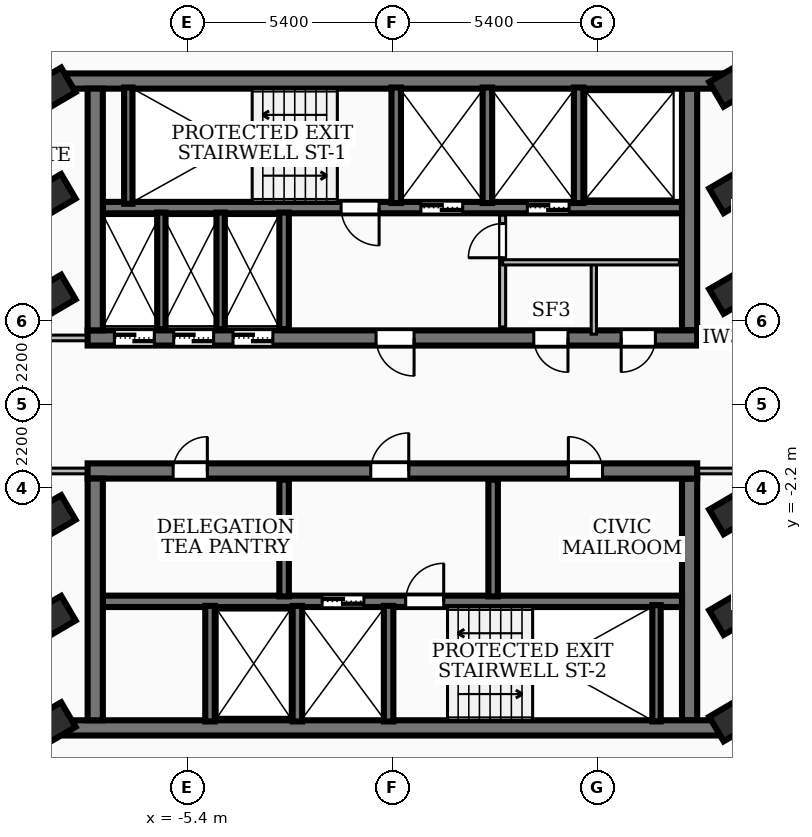
"""IFC4 building model, lengths in metres.
Left out: names, types, materials, properties, quantities, classifications, styles, units other than length and angle.
Written with IfcOpenShell. Run it as: python <this file> out.ifc"""

import sys

from ifc_helpers import new_model, si_unit, direction, frame, frame_2d, origin, origin_2d, place, context, subcontext, project, spatial, rectangle, extrude, element, fill, save


model = new_model("IFC4")
c1 = context("Model", 3, precision=1e-05, world=origin(), true_north=direction((0.0, 1.0)))
c2 = subcontext(c1, "Body", "Model", "MODEL_VIEW")
j1 = project(units=[si_unit("LENGTHUNIT", "METRE"), si_unit("PLANEANGLEUNIT", "RADIAN")], contexts=[c1])
p1 = place(None, origin())
s1 = spatial("IfcSite", under=j1, at=p1, CompositionType="ELEMENT")
p2 = place(p1, origin())
s2 = spatial("IfcBuilding", under=s1, at=p2, CompositionType="ELEMENT")
p3 = place(p2, frame((0.0, 0.0, 205.2)))
s3 = spatial("IfcBuildingStorey", under=s2, at=p3, CompositionType="ELEMENT", Elevation=205.2)
p4 = place(p3, frame((-8.78, 8.51, 0.0), z_axis=(0.0, 0.0, 1.0), x_axis=(1.0, 0.0, 0.0)))
e1 = element("IfcWall", 1, at=p4, inside=s3, PredefinedType="SHEAR", context=c2, shape_type="SweptSolid", body=[
    extrude(rectangle(XDim=17.56, YDim=0.4, at=frame_2d((8.78, 0.0))), origin(), (0.0, 0.0, 1.0), 3.16),
])
p5 = place(p3, frame((8.02, 1.75, 0.0), z_axis=(0.0, 0.0, 1.0), x_axis=(-1.0, 0.0, 0.0)))
e2 = element("IfcWall", 2, at=p5, inside=s3, PredefinedType="SHEAR", context=c2, shape_type="SweptSolid", body=[
    extrude(rectangle(XDim=16.04, YDim=0.4, at=frame_2d((8.02, 0.0))), origin(), (0.0, 0.0, 1.0), 3.16),
])
p6 = place(p5, frame((7.45, 0.0, 0.0)))
e3 = element("IfcOpeningElement", 3, at=p6, cuts=e2, PredefinedType="OPENING", context=c2, shape_type="SweptSolid", body=[
    extrude(rectangle(XDim=1.0, YDim=2.1, at=frame_2d((0.5, 1.05))), frame((0.0, 0.21, 0.0), z_axis=(0.0, -1.0, 0.0), x_axis=(1.0, 0.0, 0.0)), (0.0, 0.0, 1.0), 0.42),
])
p7 = place(p5, frame((14.285, 0.0, 0.0)))
e4 = element("IfcOpeningElement", 4, at=p7, cuts=e2, PredefinedType="OPENING", context=c2, shape_type="SweptSolid", body=[
    extrude(rectangle(XDim=1.05, YDim=2.15, at=frame_2d((0.525, 1.075))), frame((0.0, 0.21, 0.0), z_axis=(0.0, -1.0, 0.0), x_axis=(1.0, 0.0, 0.0)), (0.0, 0.0, 1.0), 0.42),
])
p8 = place(p5, frame((12.725, 0.0, 0.0)))
e5 = element("IfcOpeningElement", 5, at=p8, cuts=e2, PredefinedType="OPENING", context=c2, shape_type="SweptSolid", body=[
    extrude(rectangle(XDim=1.05, YDim=2.15, at=frame_2d((0.525, 1.075))), frame((0.0, 0.21, 0.0), z_axis=(0.0, -1.0, 0.0), x_axis=(1.0, 0.0, 0.0)), (0.0, 0.0, 1.0), 0.42),
])
p9 = place(p5, frame((11.165, 0.0, 0.0)))
e6 = element("IfcOpeningElement", 6, at=p9, cuts=e2, PredefinedType="OPENING", context=c2, shape_type="SweptSolid", body=[
    extrude(rectangle(XDim=1.05, YDim=2.15, at=frame_2d((0.525, 1.075))), frame((0.0, 0.21, 0.0), z_axis=(0.0, -1.0, 0.0), x_axis=(1.0, 0.0, 0.0)), (0.0, 0.0, 1.0), 0.42),
])
p10 = place(p5, frame((3.4, 0.0, 0.0)))
e7 = element("IfcOpeningElement", 7, at=p10, cuts=e2, PredefinedType="OPENING", context=c2, shape_type="SweptSolid", body=[
    extrude(rectangle(XDim=0.9, YDim=2.06, at=frame_2d((0.45, 1.03))), frame((0.0, 0.21, 0.0), z_axis=(0.0, -1.0, 0.0), x_axis=(1.0, 0.0, 0.0)), (0.0, 0.0, 1.0), 0.42),
])
p11 = place(p5, frame((1.1, 0.0, 0.0)))
e8 = element("IfcOpeningElement", 8, at=p11, cuts=e2, PredefinedType="OPENING", context=c2, shape_type="SweptSolid", body=[
    extrude(rectangle(XDim=0.9, YDim=2.06, at=frame_2d((0.45, 1.03))), frame((0.0, 0.21, 0.0), z_axis=(0.0, -1.0, 0.0), x_axis=(1.0, 0.0, 0.0)), (0.0, 0.0, 1.0), 0.42),
])
for number, where, z_axis, x_axis in (
    (9, (-7.82, 1.95, 0.0), (0.0, 0.0, 1.0), (0.0, 1.0, 0.0)),
    (10, (7.82, 8.31, 0.0), (0.0, 0.0, 1.0), (0.0, -1.0, 0.0)),
):
    element("IfcWall", number, at=place(p3, frame(where, z_axis=z_axis, x_axis=x_axis)), inside=s3, PredefinedType="SHEAR", context=c2, shape_type="SweptSolid", body=[
        extrude(rectangle(XDim=6.36, YDim=0.4, at=frame_2d((3.18, 0.0))), origin(), (0.0, 0.0, 1.0), 3.16),
    ])
p12 = place(p3, frame((7.62, 5.18, 0.0), z_axis=(0.0, 0.0, 1.0), x_axis=(-1.0, 0.0, 0.0)))
e11 = element("IfcWall", 11, at=p12, inside=s3, PredefinedType="SOLIDWALL", context=c2, shape_type="SweptSolid", body=[
    extrude(rectangle(XDim=15.24, YDim=0.3, at=frame_2d((7.62, 0.0))), origin(), (0.0, 0.0, 1.0), 3.16),
])
p13 = place(p12, frame((5.77, 0.0, 0.0)))
e12 = element("IfcOpeningElement", 12, at=p13, cuts=e11, PredefinedType="OPENING", context=c2, shape_type="SweptSolid", body=[
    extrude(rectangle(XDim=1.1, YDim=2.15, at=frame_2d((0.55, 1.075))), frame((0.0, 0.16, 0.0), z_axis=(0.0, -1.0, 0.0), x_axis=(1.0, 0.0, 0.0)), (0.0, 0.0, 1.0), 0.32),
])
p14 = place(p12, frame((2.97, 0.0, 0.0)))
e13 = element("IfcOpeningElement", 13, at=p14, cuts=e11, PredefinedType="OPENING", context=c2, shape_type="SweptSolid", body=[
    extrude(rectangle(XDim=1.1, YDim=2.15, at=frame_2d((0.55, 1.075))), frame((0.0, 0.16, 0.0), z_axis=(0.0, -1.0, 0.0), x_axis=(1.0, 0.0, 0.0)), (0.0, 0.0, 1.0), 0.32),
])
p15 = place(p12, frame((7.97, 0.0, 0.0)))
e14 = element("IfcOpeningElement", 14, at=p15, cuts=e11, PredefinedType="OPENING", context=c2, shape_type="SweptSolid", body=[
    extrude(rectangle(XDim=1.0, YDim=2.1, at=frame_2d((0.5, 1.05))), frame((0.0, 0.16, 0.0), z_axis=(0.0, -1.0, 0.0), x_axis=(1.0, 0.0, 0.0)), (0.0, 0.0, 1.0), 0.32),
])
p16 = place(p3, frame((8.78, -8.51, 0.0), z_axis=(0.0, 0.0, 1.0), x_axis=(-1.0, 0.0, 0.0)))
e15 = element("IfcWall", 15, at=p16, inside=s3, PredefinedType="SHEAR", context=c2, shape_type="SweptSolid", body=[
    extrude(rectangle(XDim=17.56, YDim=0.4, at=frame_2d((8.78, 0.0))), origin(), (0.0, 0.0, 1.0), 3.16),
])
p17 = place(p3, frame((-8.02, -1.75, 0.0), z_axis=(0.0, 0.0, 1.0), x_axis=(1.0, 0.0, 0.0)))
e16 = element("IfcWall", 16, at=p17, inside=s3, PredefinedType="SHEAR", context=c2, shape_type="SweptSolid", body=[
    extrude(rectangle(XDim=16.04, YDim=0.4, at=frame_2d((8.02, 0.0))), origin(), (0.0, 0.0, 1.0), 3.16),
])
p18 = place(p17, frame((7.45, 0.0, 0.0)))
e17 = element("IfcOpeningElement", 17, at=p18, cuts=e16, PredefinedType="OPENING", context=c2, shape_type="SweptSolid", body=[
    extrude(rectangle(XDim=1.0, YDim=2.1, at=frame_2d((0.5, 1.05))), frame((0.0, 0.21, 0.0), z_axis=(0.0, -1.0, 0.0), x_axis=(1.0, 0.0, 0.0)), (0.0, 0.0, 1.0), 0.42),
])
p19 = place(p17, frame((12.65, 0.0, 0.0)))
e18 = element("IfcOpeningElement", 18, at=p19, cuts=e16, PredefinedType="OPENING", context=c2, shape_type="SweptSolid", body=[
    extrude(rectangle(XDim=0.9, YDim=2.06, at=frame_2d((0.45, 1.03))), frame((0.0, 0.21, 0.0), z_axis=(0.0, -1.0, 0.0), x_axis=(1.0, 0.0, 0.0)), (0.0, 0.0, 1.0), 0.42),
])
p20 = place(p17, frame((2.25, 0.0, 0.0)))
e19 = element("IfcOpeningElement", 19, at=p20, cuts=e16, PredefinedType="OPENING", context=c2, shape_type="SweptSolid", body=[
    extrude(rectangle(XDim=0.9, YDim=2.06, at=frame_2d((0.45, 1.03))), frame((0.0, 0.21, 0.0), z_axis=(0.0, -1.0, 0.0), x_axis=(1.0, 0.0, 0.0)), (0.0, 0.0, 1.0), 0.42),
])
for number, where, z_axis, x_axis in (
    (20, (-7.82, -8.31, 0.0), (0.0, 0.0, 1.0), (0.0, 1.0, 0.0)),
    (21, (7.82, -1.95, 0.0), (0.0, 0.0, 1.0), (0.0, -1.0, 0.0)),
):
    element("IfcWall", number, at=place(p3, frame(where, z_axis=z_axis, x_axis=x_axis)), inside=s3, PredefinedType="SHEAR", context=c2, shape_type="SweptSolid", body=[
        extrude(rectangle(XDim=6.36, YDim=0.4, at=frame_2d((3.18, 0.0))), origin(), (0.0, 0.0, 1.0), 3.16),
    ])
p21 = place(p3, frame((-7.62, -5.18, 0.0), z_axis=(0.0, 0.0, 1.0), x_axis=(1.0, 0.0, 0.0)))
e22 = element("IfcWall", 22, at=p21, inside=s3, PredefinedType="SOLIDWALL", context=c2, shape_type="SweptSolid", body=[
    extrude(rectangle(XDim=15.24, YDim=0.3, at=frame_2d((7.62, 0.0))), origin(), (0.0, 0.0, 1.0), 3.16),
])
p22 = place(p21, frame((5.77, 0.0, 0.0)))
e23 = element("IfcOpeningElement", 23, at=p22, cuts=e22, PredefinedType="OPENING", context=c2, shape_type="SweptSolid", body=[
    extrude(rectangle(XDim=1.1, YDim=2.15, at=frame_2d((0.55, 1.075))), frame((0.0, 0.16, 0.0), z_axis=(0.0, -1.0, 0.0), x_axis=(1.0, 0.0, 0.0)), (0.0, 0.0, 1.0), 0.32),
])
p23 = place(p21, frame((7.97, 0.0, 0.0)))
e24 = element("IfcOpeningElement", 24, at=p23, cuts=e22, PredefinedType="OPENING", context=c2, shape_type="SweptSolid", body=[
    extrude(rectangle(XDim=1.0, YDim=2.1, at=frame_2d((0.5, 1.05))), frame((0.0, 0.16, 0.0), z_axis=(0.0, -1.0, 0.0), x_axis=(1.0, 0.0, 0.0)), (0.0, 0.0, 1.0), 0.32),
])
for number, where, z_axis, x_axis in (
    (25, (-6.95, 5.28, 0.0), (0.0, 0.0, 1.0), (0.0, 1.0, 0.0)),
    (26, (6.95, -8.34, 0.0), (0.0, 0.0, 1.0), (0.0, 1.0, 0.0)),
):
    element("IfcWall", number, at=place(p3, frame(where, z_axis=z_axis, x_axis=x_axis)), inside=s3, PredefinedType="SOLIDWALL", context=c2, shape_type="SweptSolid", body=[
        extrude(rectangle(XDim=3.06, YDim=0.22, at=frame_2d((1.53, 0.0))), origin(), (0.0, 0.0, 1.0), 3.16),
    ])
for number, where, z_axis, x_axis in (
    (27, (0.1, 5.3, 0.0), (0.0, 0.0, 1.0), (0.0, 1.0, 0.0)),
    (28, (2.5, 5.3, 0.0), (0.0, 0.0, 1.0), (0.0, 1.0, 0.0)),
    (29, (4.9, 5.3, 0.0), (0.0, 0.0, 1.0), (0.0, 1.0, 0.0)),
):
    element("IfcWall", number, at=place(p3, frame(where, z_axis=z_axis, x_axis=x_axis)), inside=s3, PredefinedType="SOLIDWALL", context=c2, shape_type="SweptSolid", body=[
        extrude(rectangle(XDim=3.04, YDim=0.25, at=frame_2d((1.52, 0.0))), origin(), (0.0, 0.0, 1.0), 3.16),
    ])
p24 = place(p3, frame((-2.85, 1.98, 0.0), z_axis=(0.0, 0.0, 1.0), x_axis=(0.0, 1.0, 0.0)))
e30 = element("IfcWall", 30, at=p24, inside=s3, PredefinedType="SOLIDWALL", context=c2, shape_type="SweptSolid", body=[
    extrude(rectangle(XDim=3.07, YDim=0.25, at=frame_2d((1.535, 0.0))), origin(), (0.0, 0.0, 1.0), 3.16),
])
for number, where, z_axis, x_axis in (
    (31, (-0.1, -8.34, 0.0), (0.0, 0.0, 1.0), (0.0, 1.0, 0.0)),
    (32, (-2.5, -8.34, 0.0), (0.0, 0.0, 1.0), (0.0, 1.0, 0.0)),
    (33, (-4.8, -8.34, 0.0), (0.0, 0.0, 1.0), (0.0, 1.0, 0.0)),
):
    element("IfcWall", number, at=place(p3, frame(where, z_axis=z_axis, x_axis=x_axis)), inside=s3, PredefinedType="SOLIDWALL", context=c2, shape_type="SweptSolid", body=[
        extrude(rectangle(XDim=3.04, YDim=0.25, at=frame_2d((1.52, 0.0))), origin(), (0.0, 0.0, 1.0), 3.16),
    ])
for number, where, z_axis, x_axis in (
    (34, (-2.85, -5.05, 0.0), (0.0, 0.0, 1.0), (0.0, 1.0, 0.0)),
    (35, (2.65, -5.05, 0.0), (0.0, 0.0, 1.0), (0.0, 1.0, 0.0)),
):
    element("IfcWall", number, at=place(p3, frame(where, z_axis=z_axis, x_axis=x_axis)), inside=s3, PredefinedType="SOLIDWALL", context=c2, shape_type="SweptSolid", body=[
        extrude(rectangle(XDim=3.07, YDim=0.25, at=frame_2d((1.535, 0.0))), origin(), (0.0, 0.0, 1.0), 3.16),
    ])
for number, where, z_axis, x_axis in (
    (36, (-6.08, 1.98, 0.0), (0.0, 0.0, 1.0), (0.0, 1.0, 0.0)),
    (37, (-4.52, 1.98, 0.0), (0.0, 0.0, 1.0), (0.0, 1.0, 0.0)),
):
    element("IfcWall", number, at=place(p3, frame(where, z_axis=z_axis, x_axis=x_axis)), inside=s3, PredefinedType="SOLIDWALL", context=c2, shape_type="SweptSolid", body=[
        extrude(rectangle(XDim=3.07, YDim=0.22, at=frame_2d((1.535, 0.0))), origin(), (0.0, 0.0, 1.0), 3.16),
    ])
for number, where, z_axis, x_axis in (
    (38, (-8.85, -5.55, 0.0), (0.0, 0.0, 1.0), (0.863, 0.506, 0.0)),
    (39, (-8.85, -2.9, 0.0), (0.0, 0.0, 1.0), (0.863, 0.506, 0.0)),
    (40, (-8.85, 2.9, 0.0), (0.0, 0.0, 1.0), (0.863, 0.506, 0.0)),
    (41, (-8.85, 5.55, 0.0), (0.0, 0.0, 1.0), (0.863, 0.506, 0.0)),
    (42, (8.85, -5.55, 0.0), (0.0, 0.0, 1.0), (0.863, 0.506, 0.0)),
    (43, (8.85, -2.9, 0.0), (0.0, 0.0, 1.0), (0.863, 0.506, 0.0)),
    (44, (8.85, 2.9, 0.0), (0.0, 0.0, 1.0), (0.863, 0.506, 0.0)),
    (45, (8.85, 5.55, 0.0), (0.0, 0.0, 1.0), (0.863, 0.506, 0.0)),
    (46, (-8.85, 8.35, 0.0), (0.0, 0.0, 1.0), (0.863, 0.506, 0.0)),
    (47, (8.85, -8.35, 0.0), (0.0, 0.0, 1.0), (0.863, 0.506, 0.0)),
    (48, (8.85, 8.35, 0.0), (0.0, 0.0, 1.0), (0.863, 0.506, 0.0)),
    (49, (-8.85, -8.35, 0.0), (0.0, 0.0, 1.0), (0.863, 0.506, 0.0)),
):
    element("IfcColumn", number, at=place(p3, frame(where, z_axis=z_axis, x_axis=x_axis)), inside=s3, PredefinedType="COLUMN", context=c2, shape_type="SweptSolid", body=[
        extrude(rectangle(XDim=0.75, YDim=0.75, at=origin_2d()), origin(), (0.0, 0.0, 1.0), 3.42),
    ])
p25 = place(p3, frame((-5.904, -18.492, 0.0), z_axis=(0.0, 0.0, 1.0), x_axis=(-0.506046465446, 0.862506217258, 0.0)))
e50 = element("IfcWall", 50, at=p25, inside=s3, PredefinedType="SOLIDWALL", context=c2, shape_type="SweptSolid", body=[
    extrude(rectangle(XDim=25.924, YDim=0.2, at=frame_2d((12.962, 0.0))), origin(), (0.0, 0.0, 1.0), 3.16),
])
p26 = place(p25, frame((0.85, 0.0, 0.85)))
e51 = element("IfcOpeningElement", 51, at=p26, cuts=e50, PredefinedType="OPENING", context=c2, shape_type="SweptSolid", body=[
    extrude(rectangle(XDim=1.8, YDim=2.0, at=frame_2d((0.9, 1.0))), frame((0.0, 0.11, 0.0), z_axis=(0.0, -1.0, 0.0), x_axis=(1.0, 0.0, 0.0)), (0.0, 0.0, 1.0), 0.22),
])
p27 = place(p3, frame((2.9, 2.04, 0.0), z_axis=(0.0, 0.0, 1.0), x_axis=(0.0, 1.0, 0.0)))
e52 = element("IfcWall", 52, at=p27, inside=s3, PredefinedType="PARTITIONING", context=c2, shape_type="SweptSolid", body=[
    extrude(rectangle(XDim=2.94, YDim=0.16, at=frame_2d((1.47, 0.0))), origin(), (0.0, 0.0, 1.0), 2.39),
])
p28 = place(p27, frame((1.82, 0.0, 0.0)))
e53 = element("IfcOpeningElement", 53, at=p28, cuts=e52, PredefinedType="OPENING", context=c2, shape_type="SweptSolid", body=[
    extrude(rectangle(XDim=0.9, YDim=2.06, at=frame_2d((0.45, 1.03))), frame((0.0, 0.09, 0.0), z_axis=(0.0, -1.0, 0.0), x_axis=(1.0, 0.0, 0.0)), (0.0, 0.0, 1.0), 0.18),
])
p29 = place(p3, frame((2.9, 3.74, 0.0), z_axis=(0.0, 0.0, 1.0), x_axis=(1.0, 0.0, 0.0)))
e54 = element("IfcWall", 54, at=p29, inside=s3, PredefinedType="PARTITIONING", context=c2, shape_type="SweptSolid", body=[
    extrude(rectangle(XDim=4.65, YDim=0.138, at=frame_2d((2.325, 0.0))), origin(), (0.0, 0.0, 1.0), 3.16),
])
p30 = place(p3, frame((5.3, 1.85, 0.0), z_axis=(0.0, 0.0, 1.0), x_axis=(0.0, 1.0, 0.0)))
e55 = element("IfcWall", 55, at=p30, inside=s3, PredefinedType="PARTITIONING", context=c2, shape_type="SweptSolid", body=[
    extrude(rectangle(XDim=1.89, YDim=0.138, at=frame_2d((0.945, 0.0))), origin(), (0.0, 0.0, 1.0), 2.39),
])
for number, where, z_axis, x_axis in (
    (56, (-7.85, 1.75, 0.0), (0.0, 0.0, 1.0), (-1.0, 0.0, 0.0)),
    (57, (-7.85, -1.75, 0.0), (0.0, 0.0, 1.0), (-1.0, 0.0, 0.0)),
    (58, (7.85, 1.75, 0.0), (0.0, 0.0, 1.0), (1.0, 0.0, 0.0)),
    (59, (7.85, -1.75, 0.0), (0.0, 0.0, 1.0), (1.0, 0.0, 0.0)),
):
    element("IfcWall", number, at=place(p3, frame(where, z_axis=z_axis, x_axis=x_axis)), inside=s3, PredefinedType="PARTITIONING", context=c2, shape_type="SweptSolid", body=[
        extrude(rectangle(XDim=1.67, YDim=0.15, at=frame_2d((0.835, 0.0))), origin(), (0.0, 0.0, 1.0), 2.39),
    ])
p31 = place(p3, frame((11.632, 8.413, 0.0), z_axis=(0.0, 0.0, 1.0), x_axis=(-0.506057561451, 0.862499706955, 0.0)))
e60 = element("IfcWall", 60, at=p31, inside=s3, PredefinedType="PARTITIONING", context=c2, shape_type="SweptSolid", body=[
    extrude(rectangle(XDim=7.95, YDim=0.145, at=frame_2d((3.975, 0.0))), origin(), (0.0, 0.0, 1.0), 2.53),
])
p32 = place(p3, frame((-15.873, 7.255, 0.0), z_axis=(0.0, 0.0, 1.0), x_axis=(0.862498672631, 0.506059324299, 0.0)))
e61 = element("IfcWall", 61, at=p32, inside=s3, PredefinedType="PARTITIONING", context=c2, shape_type="SweptSolid", body=[
    extrude(rectangle(XDim=20.039, YDim=0.145, at=frame_2d((10.02, 0.0))), origin(), (0.0, 0.0, 1.0), 2.53),
])
p33 = place(p32, frame((9.42, 0.0, 0.0)))
e62 = element("IfcOpeningElement", 62, at=p33, cuts=e61, PredefinedType="OPENING", context=c2, shape_type="SweptSolid", body=[
    extrude(rectangle(XDim=1.2, YDim=2.1, at=frame_2d((0.6, 1.05))), frame((0.0, 0.083, 0.0), z_axis=(0.0, -1.0, 0.0), x_axis=(1.0, 0.0, 0.0)), (0.0, 0.0, 1.0), 0.165),
])
p34 = place(p3, frame((15.873, -7.255, 0.0), z_axis=(0.0, 0.0, 1.0), x_axis=(-0.862498672631, -0.506059324299, 0.0)))
e63 = element("IfcWall", 63, at=p34, inside=s3, PredefinedType="PARTITIONING", context=c2, shape_type="SweptSolid", body=[
    extrude(rectangle(XDim=20.039, YDim=0.145, at=frame_2d((10.02, 0.0))), origin(), (0.0, 0.0, 1.0), 2.53),
])
p35 = place(p34, frame((9.42, 0.0, 0.0)))
e64 = element("IfcOpeningElement", 64, at=p35, cuts=e63, PredefinedType="OPENING", context=c2, shape_type="SweptSolid", body=[
    extrude(rectangle(XDim=1.2, YDim=2.1, at=frame_2d((0.6, 1.05))), frame((0.0, 0.083, 0.0), z_axis=(0.0, -1.0, 0.0), x_axis=(1.0, 0.0, 0.0)), (0.0, 0.0, 1.0), 0.165),
])
p36 = place(p6, origin())
e65 = element("IfcDoor", 65, at=p36, inside=s3, OperationType="SINGLE_SWING_LEFT", PredefinedType="DOOR", context=c2, shape_type="SweptSolid", body=[
    extrude(rectangle(XDim=1.0, YDim=2.1, at=frame_2d((0.5, 1.05))), frame((0.0, 0.025, 0.0), z_axis=(0.0, -1.0, 0.0), x_axis=(1.0, 0.0, 0.0)), (0.0, 0.0, 1.0), 0.05),
])
fill(e3, e65)
p37 = place(p18, origin())
e66 = element("IfcDoor", 66, at=p37, inside=s3, OperationType="SINGLE_SWING_RIGHT", PredefinedType="DOOR", context=c2, shape_type="SweptSolid", body=[
    extrude(rectangle(XDim=1.0, YDim=2.1, at=frame_2d((0.5, 1.05))), frame((0.0, 0.025, 0.0), z_axis=(0.0, -1.0, 0.0), x_axis=(1.0, 0.0, 0.0)), (0.0, 0.0, 1.0), 0.05),
])
fill(e17, e66)
p38 = place(p13, origin())
e67 = element("IfcDoor", 67, at=p38, inside=s3, OperationType="DOUBLE_DOOR_SLIDING", PredefinedType="DOOR", context=c2, shape_type="SweptSolid", body=[
    extrude(rectangle(XDim=1.1, YDim=2.15, at=frame_2d((0.55, 1.075))), frame((0.0, 0.025, 0.0), z_axis=(0.0, -1.0, 0.0), x_axis=(1.0, 0.0, 0.0)), (0.0, 0.0, 1.0), 0.05),
])
fill(e12, e67)
p39 = place(p14, origin())
e68 = element("IfcDoor", 68, at=p39, inside=s3, OperationType="DOUBLE_DOOR_SLIDING", PredefinedType="DOOR", context=c2, shape_type="SweptSolid", body=[
    extrude(rectangle(XDim=1.1, YDim=2.15, at=frame_2d((0.55, 1.075))), frame((0.0, 0.025, 0.0), z_axis=(0.0, -1.0, 0.0), x_axis=(1.0, 0.0, 0.0)), (0.0, 0.0, 1.0), 0.05),
])
fill(e13, e68)
p40 = place(p15, origin())
e69 = element("IfcDoor", 69, at=p40, inside=s3, OperationType="SINGLE_SWING_LEFT", PredefinedType="DOOR", context=c2, shape_type="SweptSolid", body=[
    extrude(rectangle(XDim=1.0, YDim=2.1, at=frame_2d((0.5, 1.05))), frame((0.0, 0.025, 0.0), z_axis=(0.0, -1.0, 0.0), x_axis=(1.0, 0.0, 0.0)), (0.0, 0.0, 1.0), 0.05),
])
fill(e14, e69)
p41 = place(p22, origin())
e70 = element("IfcDoor", 70, at=p41, inside=s3, OperationType="DOUBLE_DOOR_SLIDING", PredefinedType="DOOR", context=c2, shape_type="SweptSolid", body=[
    extrude(rectangle(XDim=1.1, YDim=2.15, at=frame_2d((0.55, 1.075))), frame((0.0, 0.025, 0.0), z_axis=(0.0, -1.0, 0.0), x_axis=(1.0, 0.0, 0.0)), (0.0, 0.0, 1.0), 0.05),
])
fill(e23, e70)
p42 = place(p23, origin())
e71 = element("IfcDoor", 71, at=p42, inside=s3, OperationType="SINGLE_SWING_RIGHT", PredefinedType="DOOR", context=c2, shape_type="SweptSolid", body=[
    extrude(rectangle(XDim=1.0, YDim=2.1, at=frame_2d((0.5, 1.05))), frame((0.0, 0.025, 0.0), z_axis=(0.0, -1.0, 0.0), x_axis=(1.0, 0.0, 0.0)), (0.0, 0.0, 1.0), 0.05),
])
fill(e24, e71)
p43 = place(p7, origin())
e72 = element("IfcDoor", 72, at=p43, inside=s3, OperationType="DOUBLE_DOOR_SLIDING", PredefinedType="DOOR", context=c2, shape_type="SweptSolid", body=[
    extrude(rectangle(XDim=1.05, YDim=2.15, at=frame_2d((0.525, 1.075))), frame((0.0, 0.025, 0.0), z_axis=(0.0, -1.0, 0.0), x_axis=(1.0, 0.0, 0.0)), (0.0, 0.0, 1.0), 0.05),
])
fill(e4, e72)
p44 = place(p8, origin())
e73 = element("IfcDoor", 73, at=p44, inside=s3, OperationType="DOUBLE_DOOR_SLIDING", PredefinedType="DOOR", context=c2, shape_type="SweptSolid", body=[
    extrude(rectangle(XDim=1.05, YDim=2.15, at=frame_2d((0.525, 1.075))), frame((0.0, 0.025, 0.0), z_axis=(0.0, -1.0, 0.0), x_axis=(1.0, 0.0, 0.0)), (0.0, 0.0, 1.0), 0.05),
])
fill(e5, e73)
p45 = place(p9, origin())
e74 = element("IfcDoor", 74, at=p45, inside=s3, OperationType="DOUBLE_DOOR_SLIDING", PredefinedType="DOOR", context=c2, shape_type="SweptSolid", body=[
    extrude(rectangle(XDim=1.05, YDim=2.15, at=frame_2d((0.525, 1.075))), frame((0.0, 0.025, 0.0), z_axis=(0.0, -1.0, 0.0), x_axis=(1.0, 0.0, 0.0)), (0.0, 0.0, 1.0), 0.05),
])
fill(e6, e74)
p46 = place(p19, origin())
e75 = element("IfcDoor", 75, at=p46, inside=s3, OperationType="SINGLE_SWING_LEFT", PredefinedType="DOOR", context=c2, shape_type="SweptSolid", body=[
    extrude(rectangle(XDim=0.9, YDim=2.06, at=frame_2d((0.45, 1.03))), frame((0.0, 0.025, 0.0), z_axis=(0.0, -1.0, 0.0), x_axis=(1.0, 0.0, 0.0)), (0.0, 0.0, 1.0), 0.05),
])
fill(e18, e75)
p47 = place(p20, origin())
e76 = element("IfcDoor", 76, at=p47, inside=s3, OperationType="SINGLE_SWING_RIGHT", PredefinedType="DOOR", context=c2, shape_type="SweptSolid", body=[
    extrude(rectangle(XDim=0.9, YDim=2.06, at=frame_2d((0.45, 1.03))), frame((0.0, 0.025, 0.0), z_axis=(0.0, -1.0, 0.0), x_axis=(1.0, 0.0, 0.0)), (0.0, 0.0, 1.0), 0.05),
])
fill(e19, e76)
p48 = place(p10, origin())
e77 = element("IfcDoor", 77, at=p48, inside=s3, OperationType="SINGLE_SWING_LEFT", PredefinedType="DOOR", context=c2, shape_type="SweptSolid", body=[
    extrude(rectangle(XDim=0.9, YDim=2.06, at=frame_2d((0.45, 1.03))), frame((0.0, 0.025, 0.0), z_axis=(0.0, -1.0, 0.0), x_axis=(1.0, 0.0, 0.0)), (0.0, 0.0, 1.0), 0.05),
])
fill(e7, e77)
p49 = place(p11, origin())
e78 = element("IfcDoor", 78, at=p49, inside=s3, OperationType="SINGLE_SWING_RIGHT", PredefinedType="DOOR", context=c2, shape_type="SweptSolid", body=[
    extrude(rectangle(XDim=0.9, YDim=2.06, at=frame_2d((0.45, 1.03))), frame((0.0, 0.025, 0.0), z_axis=(0.0, -1.0, 0.0), x_axis=(1.0, 0.0, 0.0)), (0.0, 0.0, 1.0), 0.05),
])
fill(e8, e78)
p50 = place(p28, origin())
e79 = element("IfcDoor", 79, at=p50, inside=s3, OperationType="SINGLE_SWING_LEFT", PredefinedType="DOOR", context=c2, shape_type="SweptSolid", body=[
    extrude(rectangle(XDim=0.9, YDim=2.06, at=frame_2d((0.45, 1.03))), frame((0.0, 0.025, 0.0), z_axis=(0.0, -1.0, 0.0), x_axis=(1.0, 0.0, 0.0)), (0.0, 0.0, 1.0), 0.05),
])
fill(e53, e79)
save(model, sys.argv[1])
